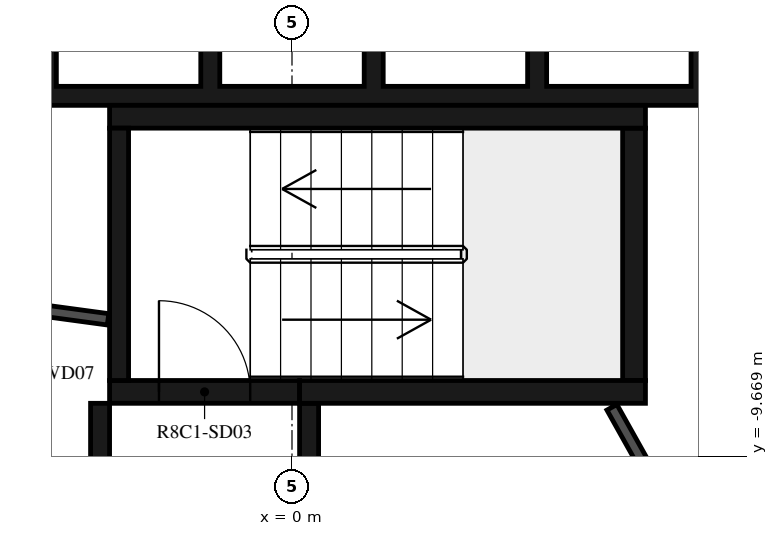
"""IFC4 building model, lengths in metres.
Left out: names, types, materials, properties, quantities, classifications, styles, units other than length and angle.
Written with IfcOpenShell. Run it as: python <this file> out.ifc"""

import sys

from ifc_helpers import new_model, si_unit, direction, frame, frame_2d, origin, place, context, subcontext, project, spatial, polyline, rectangle, outline, extrude, element, fill, save


model = new_model("IFC4")
c1 = context("Model", 3, precision=1e-05, world=origin(), true_north=direction((0.0, 1.0)))
c2 = subcontext(c1, "Body", "Model", "MODEL_VIEW")
j1 = project(units=[si_unit("LENGTHUNIT", "METRE"), si_unit("PLANEANGLEUNIT", "RADIAN")], contexts=[c1])
p1 = place(None, origin())
s1 = spatial("IfcSite", under=j1, at=p1, CompositionType="ELEMENT")
p2 = place(p1, origin())
s2 = spatial("IfcBuilding", under=s1, at=p2, CompositionType="ELEMENT")
p3 = place(p2, frame((0.0, 0.0, 322.7)))
s3 = spatial("IfcBuildingStorey", under=s2, at=p3, CompositionType="ELEMENT", Elevation=322.7)
p4 = place(p3, frame((4.51, -10.845, 0.0), z_axis=(0.0, 0.0, 1.0), x_axis=(0.865975092491, 0.500087131594, 0.0)))
e1 = element("IfcWall", 1, at=p4, inside=s3, PredefinedType="SHEAR", context=c2, shape_type="SweptSolid", body=[
    extrude(rectangle(XDim=3.033, YDim=0.5, at=frame_2d((1.516, 0.0))), origin(), (0.0, 0.0, 1.0), 3.05),
])
p5 = place(p3, frame((-2.275, -8.67, 0.0), z_axis=(0.0, 0.0, 1.0), x_axis=(0.0, 1.0, 0.0)))
e2 = element("IfcWall", 2, at=p5, inside=s3, PredefinedType="SHEAR", context=c2, shape_type="SweptSolid", body=[
    extrude(rectangle(XDim=3.32, YDim=0.25, at=frame_2d((1.66, 0.0))), origin(), (0.0, 0.0, 1.0), 3.05),
])
p6 = place(p3, frame((-2.4, -5.2, 0.0), z_axis=(0.0, 0.0, 1.0), x_axis=(1.0, 0.0, 0.0)))
e3 = element("IfcWall", 3, at=p6, inside=s3, PredefinedType="SHEAR", context=c2, shape_type="SweptSolid", body=[
    extrude(rectangle(XDim=7.05, YDim=0.3, at=frame_2d((3.525, 0.0))), origin(), (0.0, 0.0, 1.0), 3.05),
])
p7 = place(p3, frame((4.5, -8.67, 0.0), z_axis=(0.0, 0.0, 1.0), x_axis=(0.0, 1.0, 0.0)))
e4 = element("IfcWall", 4, at=p7, inside=s3, PredefinedType="SHEAR", context=c2, shape_type="SweptSolid", body=[
    extrude(rectangle(XDim=3.32, YDim=0.3, at=frame_2d((1.66, 0.0))), origin(), (0.0, 0.0, 1.0), 3.05),
])
p8 = place(p3, frame((0.1, -8.82, 0.0), z_axis=(0.0, 0.0, 1.0), x_axis=(1.0, 0.0, 0.0)))
e5 = element("IfcWall", 5, at=p8, inside=s3, PredefinedType="SHEAR", context=c2, shape_type="SweptSolid", body=[
    extrude(rectangle(XDim=4.55, YDim=0.3, at=frame_2d((2.275, 0.0))), origin(), (0.0, 0.0, 1.0), 3.05),
])
p9 = place(p3, frame((-2.4, -8.82, 0.0), z_axis=(0.0, 0.0, 1.0), x_axis=(1.0, 0.0, 0.0)))
e6 = element("IfcWall", 6, at=p9, inside=s3, PredefinedType="SHEAR", context=c2, shape_type="SweptSolid", body=[
    extrude(rectangle(XDim=2.5, YDim=0.3, at=frame_2d((1.25, 0.0))), origin(), (0.0, 0.0, 1.0), 3.05),
])
p10 = place(p9, frame((0.65, 0.0, 0.0)))
e7 = element("IfcOpeningElement", 7, at=p10, cuts=e6, PredefinedType="OPENING", context=c2, shape_type="SweptSolid", body=[
    extrude(rectangle(XDim=1.2, YDim=2.1, at=frame_2d((0.6, 1.05))), frame((0.0, 0.16, 0.0), z_axis=(0.0, -1.0, 0.0), x_axis=(1.0, 0.0, 0.0)), (0.0, 0.0, 1.0), 0.32),
])
p11 = place(p3, frame((-2.525, -8.97, 0.0), z_axis=(0.0, 0.0, 1.0), x_axis=(0.0, -1.0, 0.0)))
e8 = element("IfcWall", 8, at=p11, inside=s3, PredefinedType="SHEAR", context=c2, shape_type="SweptSolid", body=[
    extrude(rectangle(XDim=2.11, YDim=0.25, at=frame_2d((1.055, 0.0))), origin(), (0.0, 0.0, 1.0), 3.05),
])
p12 = place(p3, frame((0.225, -8.97, 0.0), z_axis=(0.0, 0.0, 1.0), x_axis=(0.0, -1.0, 0.0)))
e9 = element("IfcWall", 9, at=p12, inside=s3, PredefinedType="SHEAR", context=c2, shape_type="SweptSolid", body=[
    extrude(rectangle(XDim=2.41, YDim=0.25, at=frame_2d((1.205, 0.0))), origin(), (0.0, 0.0, 1.0), 3.05),
])
p13 = place(p3, origin())
e10 = element("IfcWall", 10, at=p13, inside=s3, PredefinedType="SHEAR", context=c2, shape_type="SweptSolid", body=[
    extrude(outline(polyline([(9.8, -5.05), (9.8, -4.8), (9.8, -1.9), (9.55, -1.9), (9.55, -4.8), (7.65, -4.8), (7.65, -1.9), (7.4, -1.9), (7.4, -4.8), (5.5, -4.8), (5.5, -1.9), (5.25, -1.9), (5.25, -4.8), (3.35, -4.8), (3.35, -1.9), (3.1, -1.9), (3.1, -4.8), (1.2, -4.8), (1.2, -1.9), (0.95, -1.9), (0.95, -4.8), (-0.95, -4.8), (-0.95, -1.9), (-1.2, -1.9), (-1.2, -4.8), (-3.1, -4.8), (-3.1, -1.9), (-3.35, -1.9), (-3.35, -4.8), (-5.25, -4.8), (-5.25, -1.9), (-5.5, -1.9), (-5.5, -4.8), (-9.55, -4.8), (-9.55, -1.9), (-9.8, -1.9), (-9.8, -4.8), (-9.8, -5.05), (9.8, -5.05)])), origin(), (0.0, 0.0, 1.0), 3.05),
])
p14 = place(p3, frame((4.922, -10.296, 0.0), z_axis=(0.0, 0.0, 1.0), x_axis=(-0.48860846254, 0.872503163509, 0.0)))
e11 = element("IfcWall", 11, at=p14, inside=s3, PredefinedType="PARTITIONING", context=c2, shape_type="SweptSolid", body=[
    extrude(rectangle(XDim=1.459, YDim=0.15, at=frame_2d((0.73, 0.0))), origin(), (0.0, 0.0, 1.0), 3.05),
])
p15 = place(p3, frame((-2.42, -7.865, 0.0), z_axis=(0.0, 0.0, 1.0), x_axis=(-0.990972299108, 0.134066783362, 0.0)))
e12 = element("IfcWall", 12, at=p15, inside=s3, PredefinedType="PARTITIONING", context=c2, shape_type="SweptSolid", body=[
    extrude(rectangle(XDim=2.176, YDim=0.15, at=frame_2d((1.088, 0.0))), origin(), (0.0, 0.0, 1.0), 3.05),
])
p16 = place(p10, origin())
e13 = element("IfcDoor", 13, at=p16, inside=s3, OperationType="SINGLE_SWING_LEFT", PredefinedType="DOOR", context=c2, shape_type="SweptSolid", body=[
    extrude(rectangle(XDim=1.2, YDim=2.1, at=frame_2d((0.6, 1.05))), frame((0.0, 0.025, 0.0), z_axis=(0.0, -1.0, 0.0), x_axis=(1.0, 0.0, 0.0)), (0.0, 0.0, 1.0), 0.05),
])
fill(e7, e13)
save(model, sys.argv[1])
